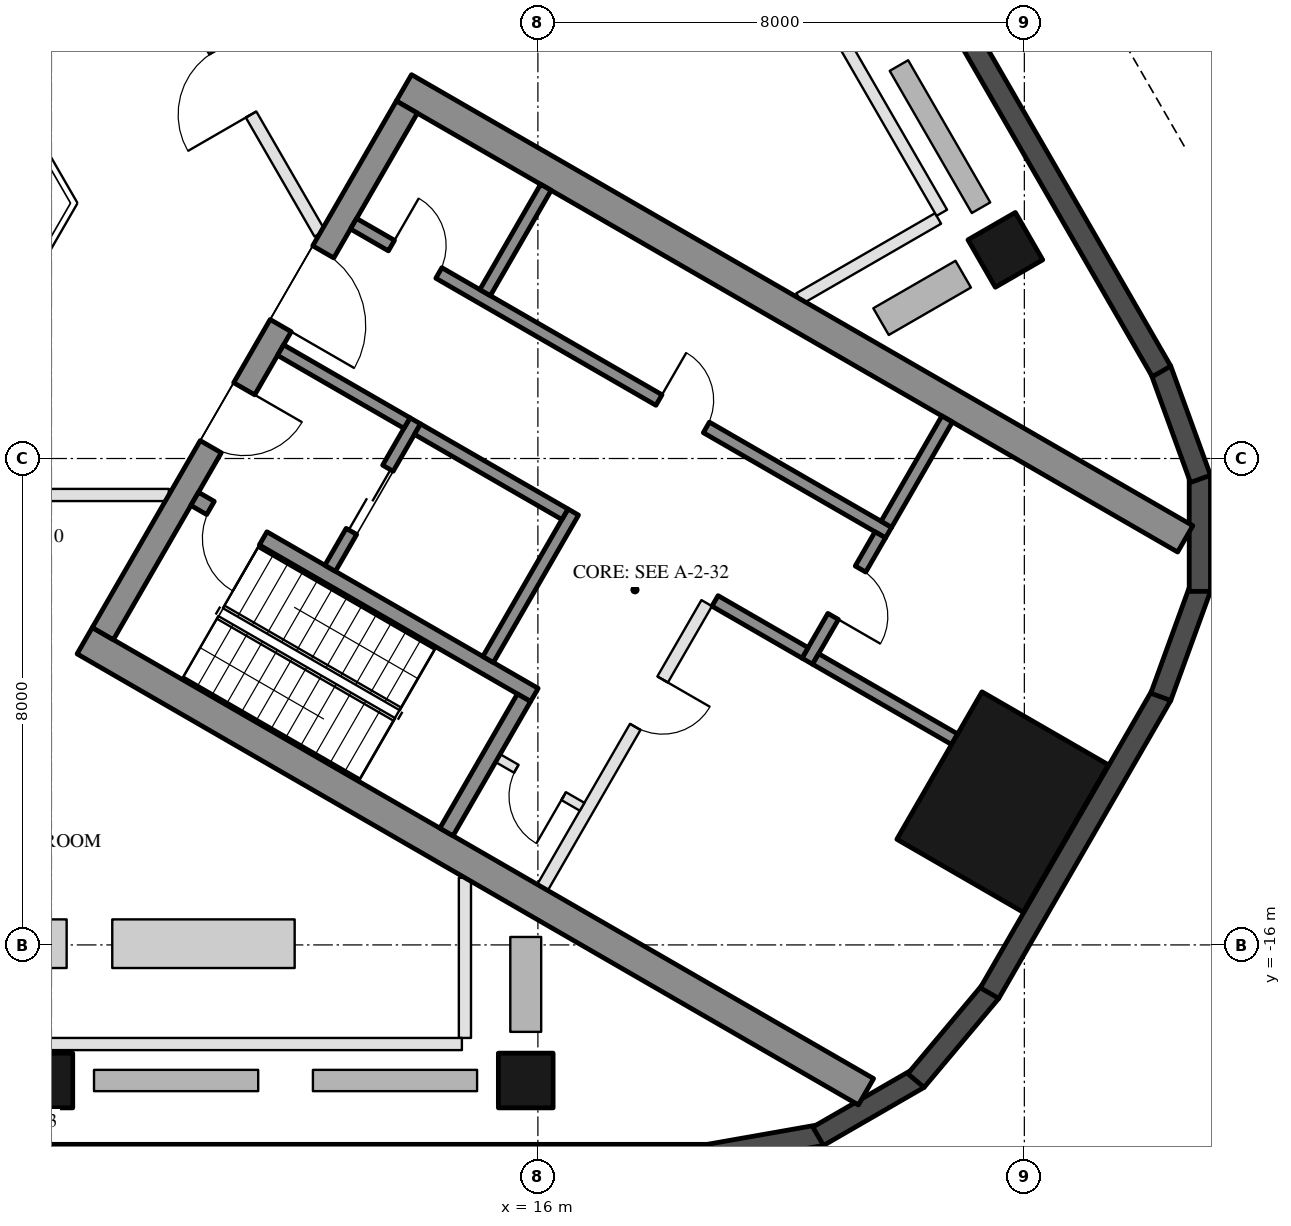
"""IFC4 building model, lengths in metres.
Left out: names, types, materials, properties, quantities, classifications, styles, units other than length and angle.
Written with IfcOpenShell. Run it as: python <this file> out.ifc"""

import sys

from ifc_helpers import new_model, si_unit, direction, frame, frame_2d, origin, origin_2d, place, context, subcontext, project, spatial, rectangle, hollow_rectangle, extrude, element, fill, save


model = new_model("IFC4")
c1 = context("Model", 3, precision=1e-05, world=origin(), true_north=direction((0.0, 1.0)))
c2 = subcontext(c1, "Body", "Model", "MODEL_VIEW")
j1 = project(units=[si_unit("LENGTHUNIT", "METRE"), si_unit("PLANEANGLEUNIT", "RADIAN")], contexts=[c1])
p1 = place(None, origin())
s1 = spatial("IfcSite", under=j1, at=p1, CompositionType="ELEMENT")
p2 = place(p1, origin())
s2 = spatial("IfcBuilding", under=s1, at=p2, CompositionType="ELEMENT")
p3 = place(p2, frame((0.0, 0.0, 142.1)))
s3 = spatial("IfcBuildingStorey", under=s2, at=p3, CompositionType="ELEMENT", Elevation=142.1)
for number, where, z_axis, x_axis in (
    (1, (7.9, -18.23, 0.0), (0.0, 0.0, 1.0), (-1.0, 0.0, 0.0)),
    (2, (15.8, -18.23, 0.0), (0.0, 0.0, 1.0), (-1.0, 0.0, 0.0)),
    (3, (23.688, -4.568, 0.0), (0.0, 0.0, 1.0), (-0.5, 0.866, 0.0)),
):
    element("IfcColumn", number, at=place(p3, frame(where, z_axis=z_axis, x_axis=x_axis)), inside=s3, PredefinedType="COLUMN", context=c2, shape_type="SweptSolid", body=[
        extrude(hollow_rectangle(XDim=0.9, YDim=0.9, WallThickness=0.04, at=origin_2d()), origin(), (0.0, 0.0, 1.0), 4.5),
    ])
p4 = place(p3, frame((23.643, -13.65, 0.0), z_axis=(0.0, 0.0, 1.0), x_axis=(0.5, 0.866025403784, 0.0)))
e4 = element("IfcColumn", 4, at=p4, inside=s3, PredefinedType="COLUMN", context=c2, shape_type="SweptSolid", body=[
    extrude(hollow_rectangle(XDim=2.8, YDim=2.4, WallThickness=0.07, at=origin_2d()), origin(), (0.0, 0.0, 1.0), 4.5),
])
p5 = place(p3, frame((-18.816, -19.455, 0.0), z_axis=(0.0, 0.0, 1.0), x_axis=(1.0, 0.0, 0.0)))
e5 = element("IfcWall", 5, at=p5, inside=s3, PredefinedType="SOLIDWALL", context=c2, shape_type="SweptSolid", body=[
    extrude(rectangle(XDim=37.632, YDim=0.35, at=frame_2d((18.816, 0.0))), origin(), (0.0, 0.0, 1.0), 4.35),
])
p6 = place(p3, frame((18.785, -19.458, 0.0), z_axis=(0.0, 0.0, 1.0), x_axis=(0.984798995425, 0.173697837091, 0.0)))
e6 = element("IfcWall", 6, at=p6, inside=s3, PredefinedType="SOLIDWALL", context=c2, shape_type="SweptSolid", body=[
    extrude(rectangle(XDim=1.91, YDim=0.35, at=frame_2d((0.955, 0.0))), origin(), (0.0, 0.0, 1.0), 4.35),
])
for number, where, z_axis, x_axis in (
    (7, (20.61, -19.147, 0.0), (0.0, 0.0, 1.0), (0.866, 0.5, 0.0)),
    (8, (22.217, -18.231, 0.0), (0.0, 0.0, 1.0), (0.643, 0.766, 0.0)),
):
    element("IfcWall", number, at=place(p3, frame(where, z_axis=z_axis, x_axis=x_axis)), inside=s3, PredefinedType="SOLIDWALL", context=c2, shape_type="SweptSolid", body=[
        extrude(rectangle(XDim=1.91, YDim=0.35, at=frame_2d((0.955, 0.0))), origin(), (0.0, 0.0, 1.0), 4.35),
    ])
p7 = place(p3, frame((23.427, -16.792, 0.0), z_axis=(0.0, 0.0, 1.0), x_axis=(0.499986410639, 0.866033249463, 0.0)))
e9 = element("IfcWall", 9, at=p7, inside=s3, PredefinedType="SOLIDWALL", context=c2, shape_type="SweptSolid", body=[
    extrude(rectangle(XDim=5.658, YDim=0.35, at=frame_2d((2.829, 0.0))), origin(), (0.0, 0.0, 1.0), 4.35),
])
for number, where, z_axis, x_axis in (
    (10, (26.244, -11.92, 0.0), (0.0, 0.0, 1.0), (0.342, 0.94, 0.0)),
    (11, (26.886, -10.185, 0.0), (0.0, 0.0, 1.0), (0.0, 1.0, 0.0)),
    (12, (26.897, -8.335, 0.0), (0.0, 0.0, 1.0), (-0.342, 0.94, 0.0)),
):
    element("IfcWall", number, at=place(p3, frame(where, z_axis=z_axis, x_axis=x_axis)), inside=s3, PredefinedType="SOLIDWALL", context=c2, shape_type="SweptSolid", body=[
        extrude(rectangle(XDim=1.91, YDim=0.35, at=frame_2d((0.955, 0.0))), origin(), (0.0, 0.0, 1.0), 4.35),
    ])
p8 = place(p3, frame((26.256, -6.567, 0.0), z_axis=(0.0, 0.0, 1.0), x_axis=(-0.499998380999, 0.866026338513, 0.0)))
e13 = element("IfcWall", 13, at=p8, inside=s3, PredefinedType="SOLIDWALL", context=c2, shape_type="SweptSolid", body=[
    extrude(rectangle(XDim=37.631, YDim=0.35, at=frame_2d((18.816, 0.0))), origin(), (0.0, 0.0, 1.0), 4.35),
])
for number, where, z_axis, x_axis in (
    (14, (8.547, -10.997, 0.0), (0.0, 0.0, 1.0), (0.866, -0.5, 0.0)),
    (15, (13.797, -1.903, 0.0), (0.0, 0.0, 1.0), (0.866, -0.5, 0.0)),
):
    element("IfcWall", number, at=place(p3, frame(where, z_axis=z_axis, x_axis=x_axis)), inside=s3, PredefinedType="SHEAR", context=c2, shape_type="SweptSolid", body=[
        extrude(rectangle(XDim=14.837, YDim=0.5, at=frame_2d((7.418, 0.0))), origin(), (0.0, 0.0, 1.0), 4.3),
    ])
p9 = place(p3, frame((8.845, -10.88, 0.0), z_axis=(0.0, 0.0, 1.0), x_axis=(0.500004234368, 0.866022959057, 0.0)))
e16 = element("IfcWall", 16, at=p9, inside=s3, PredefinedType="SHEAR", context=c2, shape_type="SweptSolid", body=[
    extrude(rectangle(XDim=10.0, YDim=0.4, at=frame_2d((5.0, 0.0))), origin(), (0.0, 0.0, 1.0), 4.3),
])
p10 = place(p9, frame((3.55, 0.0, 0.0)))
e17 = element("IfcOpeningElement", 17, at=p10, cuts=e16, PredefinedType="OPENING", context=c2, shape_type="SweptSolid", body=[
    extrude(rectangle(XDim=1.1, YDim=2.1, at=frame_2d((0.55, 1.05))), frame((0.0, 0.21, 0.0), z_axis=(0.0, -1.0, 0.0), x_axis=(1.0, 0.0, 0.0)), (0.0, 0.0, 1.0), 0.42),
])
p11 = place(p9, frame((5.85, 0.0, 0.0)))
e18 = element("IfcOpeningElement", 18, at=p11, cuts=e16, PredefinedType="OPENING", context=c2, shape_type="SweptSolid", body=[
    extrude(rectangle(XDim=1.4, YDim=2.1, at=frame_2d((0.7, 1.05))), frame((0.0, 0.21, 0.0), z_axis=(0.0, -1.0, 0.0), x_axis=(1.0, 0.0, 0.0)), (0.0, 0.0, 1.0), 0.42),
])
p12 = place(p3, frame((10.356, -8.664, 0.0), z_axis=(0.0, 0.0, 1.0), x_axis=(0.866028629588, -0.499994412703, 0.0)))
e19 = element("IfcWall", 19, at=p12, inside=s3, PredefinedType="SHEAR", context=c2, shape_type="SweptSolid", body=[
    extrude(rectangle(XDim=6.45, YDim=0.25, at=frame_2d((3.225, 0.0))), origin(), (0.0, 0.0, 1.0), 4.3),
])
p13 = place(p12, frame((0.3, 0.0, 0.0)))
e20 = element("IfcOpeningElement", 20, at=p13, cuts=e19, PredefinedType="OPENING", context=c2, shape_type="SweptSolid", body=[
    extrude(rectangle(XDim=1.0, YDim=2.1, at=frame_2d((0.5, 1.05))), frame((0.0, 0.135, 0.0), z_axis=(0.0, -1.0, 0.0), x_axis=(1.0, 0.0, 0.0)), (0.0, 0.0, 1.0), 0.27),
])
p14 = place(p3, frame((14.496, -14.143, 0.0), z_axis=(0.0, 0.0, 1.0), x_axis=(0.500062241894, 0.865989465428, 0.0)))
e21 = element("IfcWall", 21, at=p14, inside=s3, PredefinedType="SHEAR", context=c2, shape_type="SweptSolid", body=[
    extrude(rectangle(XDim=2.55, YDim=0.25, at=frame_2d((1.275, 0.0))), origin(), (0.0, 0.0, 1.0), 4.3),
])
p15 = place(p3, frame((15.181, -11.305, 0.0), z_axis=(0.0, 0.0, 1.0), x_axis=(0.49994636267, 0.866056369097, 0.0)))
e22 = element("IfcWall", 22, at=p15, inside=s3, PredefinedType="SHEAR", context=c2, shape_type="SweptSolid", body=[
    extrude(rectangle(XDim=2.8, YDim=0.2, at=frame_2d((1.4, 0.0))), origin(), (0.0, 0.0, 1.0), 4.3),
])
p16 = place(p3, frame((12.583, -9.805, 0.0), z_axis=(0.0, 0.0, 1.0), x_axis=(0.49994636267, 0.866056369097, 0.0)))
e23 = element("IfcWall", 23, at=p16, inside=s3, PredefinedType="SHEAR", context=c2, shape_type="SweptSolid", body=[
    extrude(rectangle(XDim=2.8, YDim=0.2, at=frame_2d((1.4, 0.0))), origin(), (0.0, 0.0, 1.0), 4.3),
])
p17 = place(p16, frame((0.7, 0.0, 0.0)))
e24 = element("IfcOpeningElement", 24, at=p17, cuts=e23, PredefinedType="OPENING", context=c2, shape_type="SweptSolid", body=[
    extrude(rectangle(XDim=1.2, YDim=2.1, at=frame_2d((0.6, 1.05))), frame((0.0, 0.11, 0.0), z_axis=(0.0, -1.0, 0.0), x_axis=(1.0, 0.0, 0.0)), (0.0, 0.0, 1.0), 0.22),
])
p18 = place(p3, frame((11.768, -6.217, 0.0), z_axis=(0.0, 0.0, 1.0), x_axis=(0.866050077142, -0.499957262057, 0.0)))
e25 = element("IfcWall", 25, at=p18, inside=s3, PredefinedType="SHEAR", context=c2, shape_type="SweptSolid", body=[
    extrude(rectangle(XDim=2.4, YDim=0.2, at=frame_2d((1.2, 0.0))), origin(), (0.0, 0.0, 1.0), 4.3),
])
p19 = place(p3, frame((14.02, -7.517, 0.0), z_axis=(0.0, 0.0, 1.0), x_axis=(0.866034573852, -0.49998411664, 0.0)))
e26 = element("IfcWall", 26, at=p19, inside=s3, PredefinedType="SHEAR", context=c2, shape_type="SweptSolid", body=[
    extrude(rectangle(XDim=2.8, YDim=0.2, at=frame_2d((1.4, 0.0))), origin(), (0.0, 0.0, 1.0), 4.3),
])
p20 = place(p3, frame((12.968, -4.138, 0.0), z_axis=(0.0, 0.0, 1.0), x_axis=(0.866028328073, -0.49999493495, 0.0)))
e27 = element("IfcWall", 27, at=p20, inside=s3, PredefinedType="SHEAR", context=c2, shape_type="SweptSolid", body=[
    extrude(rectangle(XDim=10.16, YDim=0.2, at=frame_2d((5.08, 0.0))), origin(), (0.0, 0.0, 1.0), 4.3),
])
p21 = place(p20, frame((0.72, 0.0, 0.0)))
e28 = element("IfcOpeningElement", 28, at=p21, cuts=e27, PredefinedType="OPENING", context=c2, shape_type="SweptSolid", body=[
    extrude(rectangle(XDim=0.9, YDim=2.1, at=frame_2d((0.45, 1.05))), frame((0.0, 0.11, 0.0), z_axis=(0.0, -1.0, 0.0), x_axis=(1.0, 0.0, 0.0)), (0.0, 0.0, 1.0), 0.22),
])
p22 = place(p20, frame((5.8, 0.0, 0.0)))
e29 = element("IfcOpeningElement", 29, at=p22, cuts=e27, PredefinedType="OPENING", context=c2, shape_type="SweptSolid", body=[
    extrude(rectangle(XDim=0.9, YDim=2.1, at=frame_2d((0.45, 1.05))), frame((0.0, 0.11, 0.0), z_axis=(0.0, -1.0, 0.0), x_axis=(1.0, 0.0, 0.0)), (0.0, 0.0, 1.0), 0.22),
])
p23 = place(p3, frame((20.43, -11.333, 0.0), z_axis=(0.0, 0.0, 1.0), x_axis=(0.500001309137, 0.866024647952, 0.0)))
e30 = element("IfcWall", 30, at=p23, inside=s3, PredefinedType="SHEAR", context=c2, shape_type="SweptSolid", body=[
    extrude(rectangle(XDim=2.4, YDim=0.2, at=frame_2d((1.2, 0.0))), origin(), (0.0, 0.0, 1.0), 4.3),
])
p24 = place(p23, frame((0.85, 0.0, 0.0)))
e31 = element("IfcOpeningElement", 31, at=p24, cuts=e30, PredefinedType="OPENING", context=c2, shape_type="SweptSolid", body=[
    extrude(rectangle(XDim=0.9, YDim=2.1, at=frame_2d((0.45, 1.05))), frame((0.0, 0.11, 0.0), z_axis=(0.0, -1.0, 0.0), x_axis=(1.0, 0.0, 0.0)), (0.0, 0.0, 1.0), 0.22),
])
p25 = place(p3, frame((18.913, -10.342, 0.0), z_axis=(0.0, 0.0, 1.0), x_axis=(0.866038183914, -0.499977863513, 0.0)))
e32 = element("IfcWall", 32, at=p25, inside=s3, PredefinedType="SHEAR", context=c2, shape_type="SweptSolid", body=[
    extrude(rectangle(XDim=1.71, YDim=0.2, at=frame_2d((0.855, 0.0))), origin(), (0.0, 0.0, 1.0), 4.3),
])
for number, where, z_axis, x_axis in (
    (33, (15.131, -5.272, 0.0), (0.0, 0.0, 1.0), (0.5, 0.866, 0.0)),
    (34, (21.73, -9.082, 0.0), (0.0, 0.0, 1.0), (0.5, 0.866, 0.0)),
):
    element("IfcWall", number, at=place(p3, frame(where, z_axis=z_axis, x_axis=x_axis)), inside=s3, PredefinedType="SHEAR", context=c2, shape_type="SweptSolid", body=[
        extrude(rectangle(XDim=2.0, YDim=0.2, at=frame_2d((1.0, 0.0))), origin(), (0.0, 0.0, 1.0), 4.3),
    ])
p26 = place(p3, frame((20.567, -11.297, 0.0), z_axis=(0.0, 0.0, 1.0), x_axis=(0.866060851709, -0.499938597367, 0.0)))
e35 = element("IfcWall", 35, at=p26, inside=s3, PredefinedType="SHEAR", context=c2, shape_type="SweptSolid", body=[
    extrude(rectangle(XDim=2.64, YDim=0.2, at=frame_2d((1.32, 0.0))), origin(), (0.0, 0.0, 1.0), 4.3),
])
p27 = place(p3, frame((16.076, -15.055, 0.0), z_axis=(0.0, 0.0, 1.0), x_axis=(0.499995103361, 0.866028230842, 0.0)))
e36 = element("IfcWall", 36, at=p27, inside=s3, PredefinedType="PARTITIONING", context=c2, shape_type="SweptSolid", body=[
    extrude(rectangle(XDim=5.4, YDim=0.2, at=frame_2d((2.7, 0.0))), origin(), (0.0, 0.0, 1.0), 4.3),
])
p28 = place(p27, frame((3.05, 0.0, 0.0)))
e37 = element("IfcOpeningElement", 37, at=p28, cuts=e36, PredefinedType="OPENING", context=c2, shape_type="SweptSolid", body=[
    extrude(rectangle(XDim=0.9, YDim=2.1, at=frame_2d((0.45, 1.05))), frame((0.0, 0.11, 0.0), z_axis=(0.0, -1.0, 0.0), x_axis=(1.0, 0.0, 0.0)), (0.0, 0.0, 1.0), 0.22),
])
p29 = place(p3, frame((15.342, -12.928, 0.0), z_axis=(0.0, 0.0, 1.0), x_axis=(0.865989903783, -0.500061482766, 0.0)))
e38 = element("IfcWall", 38, at=p29, inside=s3, PredefinedType="PARTITIONING", context=c2, shape_type="SweptSolid", body=[
    extrude(rectangle(XDim=1.6, YDim=0.15, at=frame_2d((0.8, 0.0))), origin(), (0.0, 0.0, 1.0), 4.3),
])
p30 = place(p29, frame((0.35, 0.0, 0.0)))
e39 = element("IfcOpeningElement", 39, at=p30, cuts=e38, PredefinedType="OPENING", context=c2, shape_type="SweptSolid", body=[
    extrude(rectangle(XDim=0.9, YDim=2.1, at=frame_2d((0.45, 1.05))), frame((0.0, 0.085, 0.0), z_axis=(0.0, -1.0, 0.0), x_axis=(1.0, 0.0, 0.0)), (0.0, 0.0, 1.0), 0.17),
])
p31 = place(p3, frame((14.8, -17.53, 0.0), z_axis=(0.0, 0.0, 1.0), x_axis=(0.0, 1.0, 0.0)))
e40 = element("IfcWall", 40, at=p31, inside=s3, PredefinedType="PARTITIONING", context=c2, shape_type="SweptSolid", body=[
    extrude(rectangle(XDim=2.635, YDim=0.2, at=frame_2d((1.317, 0.0))), origin(), (0.0, 0.0, 1.0), 4.35),
])
p32 = place(p3, frame((-14.75, -17.63, 0.0), z_axis=(0.0, 0.0, 1.0), x_axis=(1.0, 0.0, 0.0)))
e41 = element("IfcWall", 41, at=p32, inside=s3, PredefinedType="PARTITIONING", context=c2, shape_type="SweptSolid", body=[
    extrude(rectangle(XDim=29.5, YDim=0.2, at=frame_2d((14.75, 0.0))), origin(), (0.0, 0.0, 1.0), 3.75),
])
p33 = place(p3, frame((-9.93, -8.6, 0.0), z_axis=(0.0, 0.0, 1.0), x_axis=(1.0, 0.0, 0.0)))
e42 = element("IfcWall", 42, at=p33, inside=s3, PredefinedType="PARTITIONING", context=c2, shape_type="SweptSolid", body=[
    extrude(rectangle(XDim=19.861, YDim=0.2, at=frame_2d((9.93, 0.0))), origin(), (0.0, 0.0, 1.0), 3.75),
])
p34 = place(p33, frame((2.621, 0.0, 0.0)))
e43 = element("IfcOpeningElement", 43, at=p34, cuts=e42, PredefinedType="OPENING", context=c2, shape_type="SweptSolid", body=[
    extrude(rectangle(XDim=1.2, YDim=2.1, at=frame_2d((0.6, 1.05))), frame((0.0, 0.11, 0.0), z_axis=(0.0, -1.0, 0.0), x_axis=(1.0, 0.0, 0.0)), (0.0, 0.0, 1.0), 0.22),
])
p35 = place(p33, frame((9.581, 0.0, 0.0)))
e44 = element("IfcOpeningElement", 44, at=p35, cuts=e42, PredefinedType="OPENING", context=c2, shape_type="SweptSolid", body=[
    extrude(rectangle(XDim=1.2, YDim=2.1, at=frame_2d((0.6, 1.05))), frame((0.0, 0.11, 0.0), z_axis=(0.0, -1.0, 0.0), x_axis=(1.0, 0.0, 0.0)), (0.0, 0.0, 1.0), 0.22),
])
p36 = place(p33, frame((16.29, 0.0, 0.0)))
e45 = element("IfcOpeningElement", 45, at=p36, cuts=e42, PredefinedType="OPENING", context=c2, shape_type="SweptSolid", body=[
    extrude(rectangle(XDim=1.2, YDim=2.1, at=frame_2d((0.6, 1.05))), frame((0.0, 0.11, 0.0), z_axis=(0.0, -1.0, 0.0), x_axis=(1.0, 0.0, 0.0)), (0.0, 0.0, 1.0), 0.22),
])
p37 = place(p3, frame((22.581, -4.052, 0.0), z_axis=(0.0, 0.0, 1.0), x_axis=(-0.866038977738, -0.499976488486, 0.0)))
e46 = element("IfcWall", 46, at=p37, inside=s3, PredefinedType="PARTITIONING", context=c2, shape_type="SweptSolid", body=[
    extrude(rectangle(XDim=2.635, YDim=0.2, at=frame_2d((1.317, 0.0))), origin(), (0.0, 0.0, 1.0), 4.35),
])
p38 = place(p3, frame((22.643, -3.959, 0.0), z_axis=(0.0, 0.0, 1.0), x_axis=(-0.499998500593, 0.866026269466, 0.0)))
e47 = element("IfcWall", 47, at=p38, inside=s3, PredefinedType="PARTITIONING", context=c2, shape_type="SweptSolid", body=[
    extrude(rectangle(XDim=29.5, YDim=0.2, at=frame_2d((14.75, 0.0))), origin(), (0.0, 0.0, 1.0), 3.75),
])
p39 = place(p3, frame((12.413, -4.3, 0.0), z_axis=(0.0, 0.0, 1.0), x_axis=(-0.50000478328, 0.866022642139, 0.0)))
e48 = element("IfcWall", 48, at=p39, inside=s3, PredefinedType="PARTITIONING", context=c2, shape_type="SweptSolid", body=[
    extrude(rectangle(XDim=19.861, YDim=0.2, at=frame_2d((9.931, 0.0))), origin(), (0.0, 0.0, 1.0), 3.75),
])
p40 = place(p39, frame((2.26, 0.0, 0.0)))
e49 = element("IfcOpeningElement", 49, at=p40, cuts=e48, PredefinedType="OPENING", context=c2, shape_type="SweptSolid", body=[
    extrude(rectangle(XDim=1.2, YDim=2.1, at=frame_2d((0.6, 1.05))), frame((0.0, 0.11, 0.0), z_axis=(0.0, -1.0, 0.0), x_axis=(1.0, 0.0, 0.0)), (0.0, 0.0, 1.0), 0.22),
])
p41 = place(p39, frame((7.982, 0.0, 0.0)))
e50 = element("IfcOpeningElement", 50, at=p41, cuts=e48, PredefinedType="OPENING", context=c2, shape_type="SweptSolid", body=[
    extrude(rectangle(XDim=1.2, YDim=2.1, at=frame_2d((0.6, 1.05))), frame((0.0, 0.11, 0.0), z_axis=(0.0, -1.0, 0.0), x_axis=(1.0, 0.0, 0.0)), (0.0, 0.0, 1.0), 0.22),
])
p42 = place(p39, frame((12.929, 0.0, 0.0)))
e51 = element("IfcOpeningElement", 51, at=p42, cuts=e48, PredefinedType="OPENING", context=c2, shape_type="SweptSolid", body=[
    extrude(rectangle(XDim=1.2, YDim=2.1, at=frame_2d((0.6, 1.05))), frame((0.0, 0.11, 0.0), z_axis=(0.0, -1.0, 0.0), x_axis=(1.0, 0.0, 0.0)), (0.0, 0.0, 1.0), 0.22),
])
p43 = place(p39, frame((17.151, 0.0, 0.0)))
e52 = element("IfcOpeningElement", 52, at=p43, cuts=e48, PredefinedType="OPENING", context=c2, shape_type="SweptSolid", body=[
    extrude(rectangle(XDim=1.2, YDim=2.1, at=frame_2d((0.6, 1.05))), frame((0.0, 0.11, 0.0), z_axis=(0.0, -1.0, 0.0), x_axis=(1.0, 0.0, 0.0)), (0.0, 0.0, 1.0), 0.22),
])
p44 = place(p17, origin())
e53 = element("IfcDoor", 53, at=p44, inside=s3, OperationType="DOUBLE_DOOR_SLIDING", PredefinedType="DOOR", context=c2, shape_type="SweptSolid", body=[
    extrude(rectangle(XDim=1.2, YDim=2.1, at=frame_2d((0.6, 1.05))), frame((0.0, 0.025, 0.0), z_axis=(0.0, -1.0, 0.0), x_axis=(1.0, 0.0, 0.0)), (0.0, 0.0, 1.0), 0.05),
])
fill(e24, e53)
p45 = place(p30, frame((0.9, 0.0, 0.0), z_axis=(0.0, 0.0, 1.0), x_axis=(-1.0, 0.0, 0.0)))
e54 = element("IfcDoor", 54, at=p45, inside=s3, OperationType="SINGLE_SWING_LEFT", PredefinedType="DOOR", context=c2, shape_type="SweptSolid", body=[
    extrude(rectangle(XDim=0.9, YDim=2.1, at=frame_2d((0.45, 1.05))), frame((0.0, 0.025, 0.0), z_axis=(0.0, -1.0, 0.0), x_axis=(1.0, 0.0, 0.0)), (0.0, 0.0, 1.0), 0.05),
])
fill(e39, e54)
p46 = place(p21, origin())
e55 = element("IfcDoor", 55, at=p46, inside=s3, OperationType="SINGLE_SWING_LEFT", PredefinedType="DOOR", context=c2, shape_type="SweptSolid", body=[
    extrude(rectangle(XDim=0.9, YDim=2.1, at=frame_2d((0.45, 1.05))), frame((0.0, 0.025, 0.0), z_axis=(0.0, -1.0, 0.0), x_axis=(1.0, 0.0, 0.0)), (0.0, 0.0, 1.0), 0.05),
])
fill(e28, e55)
p47 = place(p22, origin())
e56 = element("IfcDoor", 56, at=p47, inside=s3, OperationType="SINGLE_SWING_LEFT", PredefinedType="DOOR", context=c2, shape_type="SweptSolid", body=[
    extrude(rectangle(XDim=0.9, YDim=2.1, at=frame_2d((0.45, 1.05))), frame((0.0, 0.025, 0.0), z_axis=(0.0, -1.0, 0.0), x_axis=(1.0, 0.0, 0.0)), (0.0, 0.0, 1.0), 0.05),
])
fill(e29, e56)
p48 = place(p24, frame((0.9, 0.0, 0.0), z_axis=(0.0, 0.0, 1.0), x_axis=(-1.0, 0.0, 0.0)))
e57 = element("IfcDoor", 57, at=p48, inside=s3, OperationType="SINGLE_SWING_RIGHT", PredefinedType="DOOR", context=c2, shape_type="SweptSolid", body=[
    extrude(rectangle(XDim=0.9, YDim=2.1, at=frame_2d((0.45, 1.05))), frame((0.0, 0.025, 0.0), z_axis=(0.0, -1.0, 0.0), x_axis=(1.0, 0.0, 0.0)), (0.0, 0.0, 1.0), 0.05),
])
fill(e31, e57)
p49 = place(p28, frame((0.9, 0.0, 0.0), z_axis=(0.0, 0.0, 1.0), x_axis=(-1.0, 0.0, 0.0)))
e58 = element("IfcDoor", 58, at=p49, inside=s3, OperationType="SINGLE_SWING_LEFT", PredefinedType="DOOR", context=c2, shape_type="SweptSolid", body=[
    extrude(rectangle(XDim=0.9, YDim=2.1, at=frame_2d((0.45, 1.05))), frame((0.0, 0.025, 0.0), z_axis=(0.0, -1.0, 0.0), x_axis=(1.0, 0.0, 0.0)), (0.0, 0.0, 1.0), 0.05),
])
fill(e37, e58)
p50 = place(p10, frame((1.1, 0.0, 0.0), z_axis=(0.0, 0.0, 1.0), x_axis=(-1.0, 0.0, 0.0)))
e59 = element("IfcDoor", 59, at=p50, inside=s3, OperationType="SINGLE_SWING_LEFT", PredefinedType="DOOR", context=c2, shape_type="SweptSolid", body=[
    extrude(rectangle(XDim=1.1, YDim=2.1, at=frame_2d((0.55, 1.05))), frame((0.0, 0.025, 0.0), z_axis=(0.0, -1.0, 0.0), x_axis=(1.0, 0.0, 0.0)), (0.0, 0.0, 1.0), 0.05),
])
fill(e17, e59)
p51 = place(p11, frame((1.4, 0.0, 0.0), z_axis=(0.0, 0.0, 1.0), x_axis=(-1.0, 0.0, 0.0)))
e60 = element("IfcDoor", 60, at=p51, inside=s3, OperationType="DOUBLE_DOOR_SINGLE_SWING", PredefinedType="DOOR", context=c2, shape_type="SweptSolid", body=[
    extrude(rectangle(XDim=1.4, YDim=2.1, at=frame_2d((0.7, 1.05))), frame((0.0, 0.025, 0.0), z_axis=(0.0, -1.0, 0.0), x_axis=(1.0, 0.0, 0.0)), (0.0, 0.0, 1.0), 0.05),
])
fill(e18, e60)
p52 = place(p13, frame((1.0, 0.0, 0.0), z_axis=(0.0, 0.0, 1.0), x_axis=(-1.0, 0.0, 0.0)))
e61 = element("IfcDoor", 61, at=p52, inside=s3, OperationType="SINGLE_SWING_LEFT", PredefinedType="DOOR", context=c2, shape_type="SweptSolid", body=[
    extrude(rectangle(XDim=1.0, YDim=2.1, at=frame_2d((0.5, 1.05))), frame((0.0, 0.025, 0.0), z_axis=(0.0, -1.0, 0.0), x_axis=(1.0, 0.0, 0.0)), (0.0, 0.0, 1.0), 0.05),
])
fill(e20, e61)
p53 = place(p40, origin())
e62 = element("IfcDoor", 62, at=p53, inside=s3, OperationType="SINGLE_SWING_LEFT", PredefinedType="DOOR", context=c2, shape_type="SweptSolid", body=[
    extrude(rectangle(XDim=1.2, YDim=2.1, at=frame_2d((0.6, 1.05))), frame((0.0, 0.025, 0.0), z_axis=(0.0, -1.0, 0.0), x_axis=(1.0, 0.0, 0.0)), (0.0, 0.0, 1.0), 0.05),
])
fill(e49, e62)
save(model, sys.argv[1])
